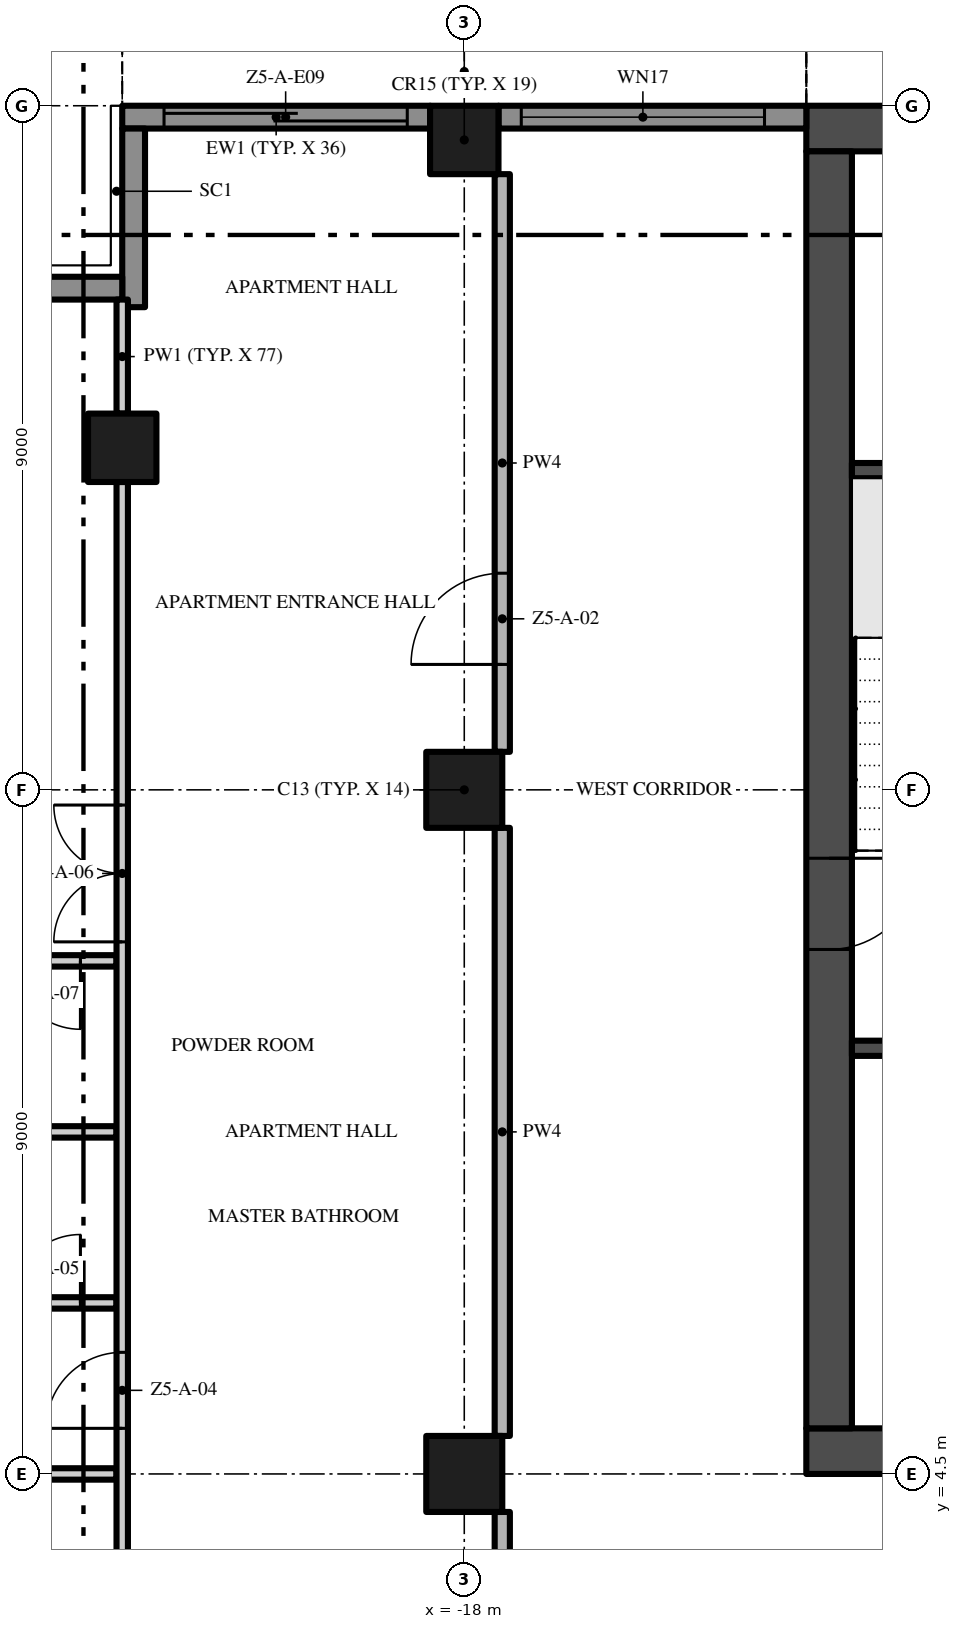
"""IFC4 building model, lengths in metres.
Left out: names, types, materials, properties, quantities, classifications, styles, units other than length and angle.
Written with IfcOpenShell. Run it as: python <this file> out.ifc"""

import sys

from ifc_helpers import new_model, si_unit, direction, frame, frame_2d, origin, origin_2d, place, context, subcontext, project, spatial, rectangle, extrude, element, fill, save


model = new_model("IFC4")
c1 = context("Model", 3, precision=1e-05, world=origin(), true_north=direction((0.0, 1.0)))
c2 = subcontext(c1, "Body", "Model", "MODEL_VIEW")
j1 = project(units=[si_unit("LENGTHUNIT", "METRE"), si_unit("PLANEANGLEUNIT", "RADIAN")], contexts=[c1])
p1 = place(None, origin())
s1 = spatial("IfcSite", under=j1, at=p1, CompositionType="ELEMENT")
p2 = place(p1, origin())
s2 = spatial("IfcBuilding", under=s1, at=p2, CompositionType="ELEMENT")
p3 = place(p2, frame((0.0, 0.0, 238.8)))
s3 = spatial("IfcBuildingStorey", under=s2, at=p3, CompositionType="ELEMENT", Elevation=238.8)
p4 = place(p3, frame((-13.5, 4.8, -0.3), z_axis=(0.0, 0.0, 1.0), x_axis=(1.0, 0.0, 0.0)))
e1 = element("IfcWall", 1, at=p4, inside=s3, PredefinedType="SHEAR", context=c2, shape_type="SweptSolid", body=[
    extrude(rectangle(XDim=27.0, YDim=0.6, at=frame_2d((13.5, 0.0))), origin(), (0.0, 0.0, 1.0), 3.8),
])
p5 = place(p4, frame((12.0, 0.0, 0.3)))
e2 = element("IfcOpeningElement", 2, at=p5, cuts=e1, PredefinedType="OPENING", context=c2, shape_type="SweptSolid", body=[
    extrude(rectangle(XDim=3.0, YDim=2.4, at=frame_2d((1.5, 1.2))), frame((0.0, 0.31, 0.0), z_axis=(0.0, -1.0, 0.0), x_axis=(1.0, 0.0, 0.0)), (0.0, 0.0, 1.0), 0.62),
])
p6 = place(p4, frame((4.9, 0.0, 0.3)))
e3 = element("IfcOpeningElement", 3, at=p6, cuts=e1, PredefinedType="OPENING", context=c2, shape_type="SweptSolid", body=[
    extrude(rectangle(XDim=1.2, YDim=2.2, at=frame_2d((0.6, 1.1))), frame((0.0, 0.31, 0.0), z_axis=(0.0, -1.0, 0.0), x_axis=(1.0, 0.0, 0.0)), (0.0, 0.0, 1.0), 0.62),
])
p7 = place(p4, frame((20.75, 0.0, 0.3)))
e4 = element("IfcOpeningElement", 4, at=p7, cuts=e1, PredefinedType="OPENING", context=c2, shape_type="SweptSolid", body=[
    extrude(rectangle(XDim=1.5, YDim=2.2, at=frame_2d((0.75, 1.1))), frame((0.0, 0.31, 0.0), z_axis=(0.0, -1.0, 0.0), x_axis=(1.0, 0.0, 0.0)), (0.0, 0.0, 1.0), 0.62),
])
p8 = place(p4, frame((17.4, 0.0, 0.3)))
e5 = element("IfcOpeningElement", 5, at=p8, cuts=e1, PredefinedType="OPENING", context=c2, shape_type="SweptSolid", body=[
    extrude(rectangle(XDim=1.2, YDim=2.2, at=frame_2d((0.6, 1.1))), frame((0.0, 0.31, 0.0), z_axis=(0.0, -1.0, 0.0), x_axis=(1.0, 0.0, 0.0)), (0.0, 0.0, 1.0), 0.62),
])
p9 = place(p3, frame((13.5, 22.2, -0.3), z_axis=(0.0, 0.0, 1.0), x_axis=(-1.0, 0.0, 0.0)))
e6 = element("IfcWall", 6, at=p9, inside=s3, PredefinedType="SHEAR", context=c2, shape_type="SweptSolid", body=[
    extrude(rectangle(XDim=27.0, YDim=0.6, at=frame_2d((13.5, 0.0))), origin(), (0.0, 0.0, 1.0), 3.8),
])
p10 = place(p3, frame((-13.2, 21.9, -0.3), z_axis=(0.0, 0.0, 1.0), x_axis=(0.0, -1.0, 0.0)))
e7 = element("IfcWall", 7, at=p10, inside=s3, PredefinedType="SHEAR", context=c2, shape_type="SweptSolid", body=[
    extrude(rectangle(XDim=16.8, YDim=0.6, at=frame_2d((8.4, 0.0))), origin(), (0.0, 0.0, 1.0), 3.8),
])
p11 = place(p10, frame((9.3, 0.0, 0.3)))
e8 = element("IfcOpeningElement", 8, at=p11, cuts=e7, PredefinedType="OPENING", context=c2, shape_type="SweptSolid", body=[
    extrude(rectangle(XDim=1.2, YDim=2.2, at=frame_2d((0.6, 1.1))), frame((0.0, 0.31, 0.0), z_axis=(0.0, -1.0, 0.0), x_axis=(1.0, 0.0, 0.0)), (0.0, 0.0, 1.0), 0.62),
])
p12 = place(p3, frame((-18.0, 13.5, 0.0), z_axis=(0.0, 0.0, 1.0), x_axis=(1.0, 0.0, 0.0)))
e9 = element("IfcColumn", 9, at=p12, inside=s3, PredefinedType="COLUMN", context=c2, shape_type="SweptSolid", body=[
    extrude(rectangle(XDim=1.0, YDim=1.0, at=origin_2d()), origin(), (0.0, 0.0, 1.0), 3.5),
])
p13 = place(p3, frame((-18.0, 22.05, 0.0), z_axis=(0.0, 0.0, 1.0), x_axis=(1.0, 0.0, 0.0)))
e10 = element("IfcColumn", 10, at=p13, inside=s3, PredefinedType="COLUMN", context=c2, shape_type="SweptSolid", body=[
    extrude(rectangle(XDim=0.9, YDim=0.9, at=origin_2d()), origin(), (0.0, 0.0, 1.0), 3.5),
])
p14 = place(p3, frame((-18.0, 4.5, 0.0), z_axis=(0.0, 0.0, 1.0), x_axis=(1.0, 0.0, 0.0)))
e11 = element("IfcColumn", 11, at=p14, inside=s3, PredefinedType="COLUMN", context=c2, shape_type="SweptSolid", body=[
    extrude(rectangle(XDim=1.0, YDim=1.0, at=origin_2d()), origin(), (0.0, 0.0, 1.0), 3.5),
])
p15 = place(p3, frame((-22.5, 18.0, 0.0), z_axis=(0.0, 0.0, 1.0), x_axis=(1.0, 0.0, 0.0)))
e12 = element("IfcColumn", 12, at=p15, inside=s3, PredefinedType="COLUMN", context=c2, shape_type="SweptSolid", body=[
    extrude(rectangle(XDim=0.9, YDim=0.9, at=origin_2d()), origin(), (0.0, 0.0, 1.0), 3.5),
])
p16 = place(p3, frame((-17.55, 22.35, 0.0), z_axis=(0.0, 0.0, 1.0), x_axis=(1.0, 0.0, 0.0)))
e13 = element("IfcWall", 13, at=p16, inside=s3, PredefinedType="SOLIDWALL", context=c2, shape_type="SweptSolid", body=[
    extrude(rectangle(XDim=4.05, YDim=0.3, at=frame_2d((2.025, 0.0))), origin(), (0.0, 0.0, 1.0), 3.5),
])
p17 = place(p16, frame((0.3, 0.0, 0.45)))
e14 = element("IfcOpeningElement", 14, at=p17, cuts=e13, PredefinedType="OPENING", context=c2, shape_type="SweptSolid", body=[
    extrude(rectangle(XDim=3.2, YDim=2.65, at=frame_2d((1.6, 1.325))), frame((0.0, 0.16, 0.0), z_axis=(0.0, -1.0, 0.0), x_axis=(1.0, 0.0, 0.0)), (0.0, 0.0, 1.0), 0.32),
])
p18 = place(p3, frame((-22.5, 22.35, 0.0), z_axis=(0.0, 0.0, 1.0), x_axis=(1.0, 0.0, 0.0)))
e15 = element("IfcWall", 15, at=p18, inside=s3, PredefinedType="SOLIDWALL", context=c2, shape_type="SweptSolid", body=[
    extrude(rectangle(XDim=4.05, YDim=0.3, at=frame_2d((2.025, 0.0))), origin(), (0.0, 0.0, 1.0), 3.5),
])
p19 = place(p18, frame((0.55, 0.0, 0.0)))
e16 = element("IfcOpeningElement", 16, at=p19, cuts=e15, PredefinedType="OPENING", context=c2, shape_type="SweptSolid", body=[
    extrude(rectangle(XDim=3.2, YDim=2.4, at=frame_2d((1.6, 1.2))), frame((0.0, 0.16, 0.0), z_axis=(0.0, -1.0, 0.0), x_axis=(1.0, 0.0, 0.0)), (0.0, 0.0, 1.0), 0.32),
])
p20 = place(p3, frame((-22.35, 19.85, 0.0), z_axis=(0.0, 0.0, 1.0), x_axis=(0.0, 1.0, 0.0)))
e17 = element("IfcWall", 17, at=p20, inside=s3, PredefinedType="SOLIDWALL", context=c2, shape_type="SweptSolid", body=[
    extrude(rectangle(XDim=2.35, YDim=0.3, at=frame_2d((1.175, 0.0))), origin(), (0.0, 0.0, 1.0), 3.5),
])
p21 = place(p3, frame((-24.75, 20.1, 0.0), z_axis=(0.0, 0.0, 1.0), x_axis=(1.0, 0.0, 0.0)))
e18 = element("IfcWall", 18, at=p21, inside=s3, PredefinedType="SOLIDWALL", context=c2, shape_type="SweptSolid", body=[
    extrude(rectangle(XDim=2.25, YDim=0.3, at=frame_2d((1.125, 0.0))), origin(), (0.0, 0.0, 1.0), 3.5),
])
for number, where, z_axis, x_axis in (
    (19, (-12.9, 10.1, 0.0), (0.0, 0.0, 1.0), (1.0, 0.0, 0.0)),
    (20, (-12.9, 17.7, 0.0), (0.0, 0.0, 1.0), (1.0, 0.0, 0.0)),
):
    element("IfcWall", number, at=place(p3, frame(where, z_axis=z_axis, x_axis=x_axis)), inside=s3, PredefinedType="SHEAR", context=c2, shape_type="SweptSolid", body=[
        extrude(rectangle(XDim=3.25, YDim=0.2, at=frame_2d((1.625, 0.0))), origin(), (0.0, 0.0, 1.0), 3.5),
    ])
p22 = place(p3, frame((-26.1, 4.5, 0.0), z_axis=(0.0, 0.0, 1.0), x_axis=(1.0, 0.0, 0.0)))
e21 = element("IfcWall", 21, at=p22, inside=s3, PredefinedType="PARTITIONING", context=c2, shape_type="SweptSolid", body=[
    extrude(rectangle(XDim=3.525, YDim=0.15, at=frame_2d((1.762, 0.0))), origin(), (0.0, 0.0, 1.0), 3.5),
])
p23 = place(p3, frame((-24.45, 6.75, 0.0), z_axis=(0.0, 0.0, 1.0), x_axis=(1.0, 0.0, 0.0)))
e22 = element("IfcWall", 22, at=p23, inside=s3, PredefinedType="PARTITIONING", context=c2, shape_type="SweptSolid", body=[
    extrude(rectangle(XDim=1.875, YDim=0.15, at=frame_2d((0.938, 0.0))), origin(), (0.0, 0.0, 1.0), 3.5),
])
p24 = place(p23, frame((0.5, 0.0, 0.0)))
e23 = element("IfcOpeningElement", 23, at=p24, cuts=e22, PredefinedType="OPENING", context=c2, shape_type="SweptSolid", body=[
    extrude(rectangle(XDim=0.9, YDim=2.1, at=frame_2d((0.45, 1.05))), frame((0.0, 0.085, 0.0), z_axis=(0.0, -1.0, 0.0), x_axis=(1.0, 0.0, 0.0)), (0.0, 0.0, 1.0), 0.17),
])
p25 = place(p3, frame((-24.45, 9.0, 0.0), z_axis=(0.0, 0.0, 1.0), x_axis=(1.0, 0.0, 0.0)))
e24 = element("IfcWall", 24, at=p25, inside=s3, PredefinedType="PARTITIONING", context=c2, shape_type="SweptSolid", body=[
    extrude(rectangle(XDim=1.875, YDim=0.15, at=frame_2d((0.938, 0.0))), origin(), (0.0, 0.0, 1.0), 3.5),
])
p26 = place(p3, frame((-22.575, 11.25, 0.0), z_axis=(0.0, 0.0, 1.0), x_axis=(-1.0, 0.0, 0.0)))
e25 = element("IfcWall", 25, at=p26, inside=s3, PredefinedType="PARTITIONING", context=c2, shape_type="SweptSolid", body=[
    extrude(rectangle(XDim=1.875, YDim=0.15, at=frame_2d((0.938, 0.0))), origin(), (0.0, 0.0, 1.0), 3.5),
])
p27 = place(p26, frame((0.475, 0.0, 0.0)))
e26 = element("IfcOpeningElement", 26, at=p27, cuts=e25, PredefinedType="OPENING", context=c2, shape_type="SweptSolid", body=[
    extrude(rectangle(XDim=0.9, YDim=2.1, at=frame_2d((0.45, 1.05))), frame((0.0, 0.085, 0.0), z_axis=(0.0, -1.0, 0.0), x_axis=(1.0, 0.0, 0.0)), (0.0, 0.0, 1.0), 0.17),
])
p28 = place(p3, frame((-22.5, 0.1, 0.0), z_axis=(0.0, 0.0, 1.0), x_axis=(0.0, 1.0, 0.0)))
e27 = element("IfcWall", 27, at=p28, inside=s3, PredefinedType="PARTITIONING", context=c2, shape_type="SweptSolid", body=[
    extrude(rectangle(XDim=17.45, YDim=0.15, at=frame_2d((8.725, 0.0))), origin(), (0.0, 0.0, 1.0), 3.5),
])
p29 = place(p28, frame((1.65, 0.0, 0.0)))
e28 = element("IfcOpeningElement", 28, at=p29, cuts=e27, PredefinedType="OPENING", context=c2, shape_type="SweptSolid", body=[
    extrude(rectangle(XDim=1.0, YDim=2.4, at=frame_2d((0.5, 1.2))), frame((0.0, 0.085, 0.0), z_axis=(0.0, -1.0, 0.0), x_axis=(1.0, 0.0, 0.0)), (0.0, 0.0, 1.0), 0.17),
])
p30 = place(p28, frame((5.0, 0.0, 0.0)))
e29 = element("IfcOpeningElement", 29, at=p30, cuts=e27, PredefinedType="OPENING", context=c2, shape_type="SweptSolid", body=[
    extrude(rectangle(XDim=1.0, YDim=2.4, at=frame_2d((0.5, 1.2))), frame((0.0, 0.085, 0.0), z_axis=(0.0, -1.0, 0.0), x_axis=(1.0, 0.0, 0.0)), (0.0, 0.0, 1.0), 0.17),
])
p31 = place(p28, frame((11.4, 0.0, 0.0)))
e30 = element("IfcOpeningElement", 30, at=p31, cuts=e27, PredefinedType="OPENING", context=c2, shape_type="SweptSolid", body=[
    extrude(rectangle(XDim=1.8, YDim=2.4, at=frame_2d((0.9, 1.2))), frame((0.0, 0.085, 0.0), z_axis=(0.0, -1.0, 0.0), x_axis=(1.0, 0.0, 0.0)), (0.0, 0.0, 1.0), 0.17),
])
p32 = place(p3, frame((-22.5, 18.45, 0.0), z_axis=(0.0, 0.0, 1.0), x_axis=(0.0, 1.0, 0.0)))
e31 = element("IfcWall", 31, at=p32, inside=s3, PredefinedType="PARTITIONING", context=c2, shape_type="SweptSolid", body=[
    extrude(rectangle(XDim=1.5, YDim=0.15, at=frame_2d((0.75, 0.0))), origin(), (0.0, 0.0, 1.0), 3.5),
])
p33 = place(p3, frame((-17.5, -0.2, 0.0), z_axis=(0.0, 0.0, 1.0), x_axis=(0.0, 1.0, 0.0)))
e32 = element("IfcWall", 32, at=p33, inside=s3, PredefinedType="PARTITIONING", context=c2, shape_type="SweptSolid", body=[
    extrude(rectangle(XDim=4.2, YDim=0.2, at=frame_2d((2.1, 0.0))), origin(), (0.0, 0.0, 1.0), 3.5),
])
p34 = place(p3, frame((-17.5, 5.0, 0.0), z_axis=(0.0, 0.0, 1.0), x_axis=(0.0, 1.0, 0.0)))
e33 = element("IfcWall", 33, at=p34, inside=s3, PredefinedType="PARTITIONING", context=c2, shape_type="SweptSolid", body=[
    extrude(rectangle(XDim=8.0, YDim=0.2, at=frame_2d((4.0, 0.0))), origin(), (0.0, 0.0, 1.0), 3.5),
])
p35 = place(p3, frame((-17.5, 14.0, 0.0), z_axis=(0.0, 0.0, 1.0), x_axis=(0.0, 1.0, 0.0)))
e34 = element("IfcWall", 34, at=p35, inside=s3, PredefinedType="PARTITIONING", context=c2, shape_type="SweptSolid", body=[
    extrude(rectangle(XDim=7.6, YDim=0.2, at=frame_2d((3.8, 0.0))), origin(), (0.0, 0.0, 1.0), 3.5),
])
p36 = place(p35, frame((1.15, 0.0, 0.0)))
e35 = element("IfcOpeningElement", 35, at=p36, cuts=e34, PredefinedType="OPENING", context=c2, shape_type="SweptSolid", body=[
    extrude(rectangle(XDim=1.2, YDim=2.4, at=frame_2d((0.6, 1.2))), frame((0.0, 0.11, 0.0), z_axis=(0.0, -1.0, 0.0), x_axis=(1.0, 0.0, 0.0)), (0.0, 0.0, 1.0), 0.22),
])
p37 = place(p17, origin())
e36 = element("IfcWindow", 36, at=p37, inside=s3, PartitioningType="SINGLE_PANEL", PredefinedType="WINDOW", context=c2, shape_type="SweptSolid", body=[
    extrude(rectangle(XDim=3.2, YDim=2.65, at=frame_2d((1.6, 1.325))), frame((0.0, 0.03, 0.0), z_axis=(0.0, -1.0, 0.0), x_axis=(1.0, 0.0, 0.0)), (0.0, 0.0, 1.0), 0.06),
])
fill(e14, e36)
p38 = place(p19, origin())
e37 = element("IfcDoor", 37, at=p38, inside=s3, OperationType="SINGLE_SWING_LEFT", PredefinedType="DOOR", context=c2, shape_type="SweptSolid", body=[
    extrude(rectangle(XDim=3.2, YDim=2.4, at=frame_2d((1.6, 1.2))), frame((0.0, 0.025, 0.0), z_axis=(0.0, -1.0, 0.0), x_axis=(1.0, 0.0, 0.0)), (0.0, 0.0, 1.0), 0.05),
])
fill(e16, e37)
p39 = place(p11, frame((1.2, 0.0, 0.0), z_axis=(0.0, 0.0, 1.0), x_axis=(-1.0, 0.0, 0.0)))
e38 = element("IfcDoor", 38, at=p39, inside=s3, OperationType="SINGLE_SWING_RIGHT", PredefinedType="DOOR", context=c2, shape_type="SweptSolid", body=[
    extrude(rectangle(XDim=1.2, YDim=2.2, at=frame_2d((0.6, 1.1))), frame((0.0, 0.025, 0.0), z_axis=(0.0, -1.0, 0.0), x_axis=(1.0, 0.0, 0.0)), (0.0, 0.0, 1.0), 0.05),
])
fill(e8, e38)
p40 = place(p36, origin())
e39 = element("IfcDoor", 39, at=p40, inside=s3, OperationType="SINGLE_SWING_LEFT", PredefinedType="DOOR", context=c2, shape_type="SweptSolid", body=[
    extrude(rectangle(XDim=1.2, YDim=2.4, at=frame_2d((0.6, 1.2))), frame((0.0, 0.025, 0.0), z_axis=(0.0, -1.0, 0.0), x_axis=(1.0, 0.0, 0.0)), (0.0, 0.0, 1.0), 0.05),
])
fill(e35, e39)
p41 = place(p30, origin())
e40 = element("IfcDoor", 40, at=p41, inside=s3, OperationType="SINGLE_SWING_LEFT", PredefinedType="DOOR", context=c2, shape_type="SweptSolid", body=[
    extrude(rectangle(XDim=1.0, YDim=2.4, at=frame_2d((0.5, 1.2))), frame((0.0, 0.025, 0.0), z_axis=(0.0, -1.0, 0.0), x_axis=(1.0, 0.0, 0.0)), (0.0, 0.0, 1.0), 0.05),
])
fill(e29, e40)
p42 = place(p24, origin())
e41 = element("IfcDoor", 41, at=p42, inside=s3, OperationType="SINGLE_SWING_RIGHT", PredefinedType="DOOR", context=c2, shape_type="SweptSolid", body=[
    extrude(rectangle(XDim=0.9, YDim=2.1, at=frame_2d((0.45, 1.05))), frame((0.0, 0.025, 0.0), z_axis=(0.0, -1.0, 0.0), x_axis=(1.0, 0.0, 0.0)), (0.0, 0.0, 1.0), 0.05),
])
fill(e23, e41)
p43 = place(p31, origin())
e42 = element("IfcDoor", 42, at=p43, inside=s3, OperationType="DOUBLE_DOOR_SINGLE_SWING", PredefinedType="DOOR", context=c2, shape_type="SweptSolid", body=[
    extrude(rectangle(XDim=1.8, YDim=2.4, at=frame_2d((0.9, 1.2))), frame((0.0, 0.025, 0.0), z_axis=(0.0, -1.0, 0.0), x_axis=(1.0, 0.0, 0.0)), (0.0, 0.0, 1.0), 0.05),
])
fill(e30, e42)
p44 = place(p27, origin())
e43 = element("IfcDoor", 43, at=p44, inside=s3, OperationType="SINGLE_SWING_LEFT", PredefinedType="DOOR", context=c2, shape_type="SweptSolid", body=[
    extrude(rectangle(XDim=0.9, YDim=2.1, at=frame_2d((0.45, 1.05))), frame((0.0, 0.025, 0.0), z_axis=(0.0, -1.0, 0.0), x_axis=(1.0, 0.0, 0.0)), (0.0, 0.0, 1.0), 0.05),
])
fill(e26, e43)
save(model, sys.argv[1])
